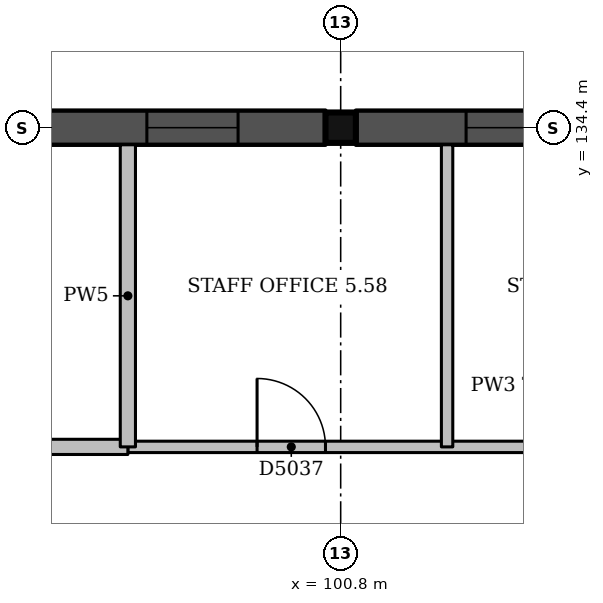
"""IFC4 building model, lengths in metres.
Left out: names, types, materials, properties, quantities, classifications, styles, units other than length and angle.
Written with IfcOpenShell. Run it as: python <this file> out.ifc"""

import sys

from ifc_helpers import new_model, si_unit, direction, frame, frame_2d, origin, origin_2d, place, context, subcontext, project, spatial, rectangle, extrude, element, fill, save


model = new_model("IFC4")
c1 = context("Model", 3, precision=1e-05, world=origin(), true_north=direction((0.0, 1.0)))
c2 = subcontext(c1, "Body", "Model", "MODEL_VIEW")
j1 = project(units=[si_unit("LENGTHUNIT", "METRE"), si_unit("PLANEANGLEUNIT", "RADIAN")], contexts=[c1])
p1 = place(None, origin())
s1 = spatial("IfcSite", under=j1, at=p1, CompositionType="ELEMENT")
p2 = place(p1, origin())
s2 = spatial("IfcBuilding", under=s1, at=p2, CompositionType="ELEMENT")
p3 = place(p2, frame((0.0, 0.0, 22.5)))
s3 = spatial("IfcBuildingStorey", under=s2, at=p3, CompositionType="ELEMENT", Elevation=22.5)
p4 = place(p3, frame((100.8, 134.4, 0.0), z_axis=(0.0, 0.0, 1.0), x_axis=(1.0, 0.0, 0.0)))
e1 = element("IfcColumn", 1, at=p4, inside=s3, PredefinedType="COLUMN", context=c2, shape_type="SweptSolid", body=[
    extrude(rectangle(XDim=0.4, YDim=0.4, at=origin_2d()), origin(), (0.0, 0.0, 1.0), 4.5),
])
p5 = place(p3, frame((104.7, 134.4, 0.0), z_axis=(0.0, 0.0, 1.0), x_axis=(-1.0, 0.0, 0.0)))
e2 = element("IfcWall", 2, at=p5, inside=s3, PredefinedType="SOLIDWALL", context=c2, shape_type="SweptSolid", body=[
    extrude(rectangle(XDim=3.7, YDim=0.45, at=frame_2d((1.85, 0.0))), origin(), (0.0, 0.0, 1.0), 3.6),
])
p6 = place(p5, frame((1.05, 0.0, 0.9)))
e3 = element("IfcOpeningElement", 3, at=p6, cuts=e2, PredefinedType="OPENING", context=c2, shape_type="SweptSolid", body=[
    extrude(rectangle(XDim=1.2, YDim=2.1, at=frame_2d((0.6, 1.05))), frame((0.0, 0.235, 0.0), z_axis=(0.0, -1.0, 0.0), x_axis=(1.0, 0.0, 0.0)), (0.0, 0.0, 1.0), 0.47),
])
p7 = place(p3, frame((100.6, 134.4, 0.0), z_axis=(0.0, 0.0, 1.0), x_axis=(-1.0, 0.0, 0.0)))
e4 = element("IfcWall", 4, at=p7, inside=s3, PredefinedType="SOLIDWALL", context=c2, shape_type="SweptSolid", body=[
    extrude(rectangle(XDim=3.7, YDim=0.45, at=frame_2d((1.85, 0.0))), origin(), (0.0, 0.0, 1.0), 3.6),
])
p8 = place(p7, frame((1.15, 0.0, 0.9)))
e5 = element("IfcOpeningElement", 5, at=p8, cuts=e4, PredefinedType="OPENING", context=c2, shape_type="SweptSolid", body=[
    extrude(rectangle(XDim=1.2, YDim=2.1, at=frame_2d((0.6, 1.05))), frame((0.0, 0.235, 0.0), z_axis=(0.0, -1.0, 0.0), x_axis=(1.0, 0.0, 0.0)), (0.0, 0.0, 1.0), 0.47),
])
p9 = place(p3, frame((98.0, 130.2, 0.0), z_axis=(0.0, 0.0, 1.0), x_axis=(1.0, 0.0, 0.0)))
e6 = element("IfcWall", 6, at=p9, inside=s3, PredefinedType="PARTITIONING", context=c2, shape_type="SweptSolid", body=[
    extrude(rectangle(XDim=11.05, YDim=0.15, at=frame_2d((5.525, 0.0))), origin(), (0.0, 0.0, 1.0), 3.6),
])
p10 = place(p9, frame((1.7, 0.0, 0.0)))
e7 = element("IfcOpeningElement", 7, at=p10, cuts=e6, PredefinedType="OPENING", context=c2, shape_type="SweptSolid", body=[
    extrude(rectangle(XDim=0.9, YDim=2.1, at=frame_2d((0.45, 1.05))), frame((0.0, 0.085, 0.0), z_axis=(0.0, -1.0, 0.0), x_axis=(1.0, 0.0, 0.0)), (0.0, 0.0, 1.0), 0.17),
])
p11 = place(p9, frame((5.9, 0.0, 0.0)))
e8 = element("IfcOpeningElement", 8, at=p11, cuts=e6, PredefinedType="OPENING", context=c2, shape_type="SweptSolid", body=[
    extrude(rectangle(XDim=0.9, YDim=2.1, at=frame_2d((0.45, 1.05))), frame((0.0, 0.085, 0.0), z_axis=(0.0, -1.0, 0.0), x_axis=(1.0, 0.0, 0.0)), (0.0, 0.0, 1.0), 0.17),
])
p12 = place(p9, frame((9.4, 0.0, 0.0)))
e9 = element("IfcOpeningElement", 9, at=p12, cuts=e6, PredefinedType="OPENING", context=c2, shape_type="SweptSolid", body=[
    extrude(rectangle(XDim=0.9, YDim=2.1, at=frame_2d((0.45, 1.05))), frame((0.0, 0.085, 0.0), z_axis=(0.0, -1.0, 0.0), x_axis=(1.0, 0.0, 0.0)), (0.0, 0.0, 1.0), 0.17),
])
p13 = place(p3, frame((89.6, 130.2, 0.0), z_axis=(0.0, 0.0, 1.0), x_axis=(1.0, 0.0, 0.0)))
e10 = element("IfcWall", 10, at=p13, inside=s3, PredefinedType="PARTITIONING", context=c2, shape_type="SweptSolid", body=[
    extrude(rectangle(XDim=8.4, YDim=0.2, at=frame_2d((4.2, 0.0))), origin(), (0.0, 0.0, 1.0), 3.6),
])
p14 = place(p13, frame((3.8, 0.0, 0.0)))
e11 = element("IfcOpeningElement", 11, at=p14, cuts=e10, PredefinedType="OPENING", context=c2, shape_type="SweptSolid", body=[
    extrude(rectangle(XDim=1.0, YDim=2.1, at=frame_2d((0.5, 1.05))), frame((0.0, 0.11, 0.0), z_axis=(0.0, -1.0, 0.0), x_axis=(1.0, 0.0, 0.0)), (0.0, 0.0, 1.0), 0.22),
])
p15 = place(p3, frame((98.0, 130.2, 0.0), z_axis=(0.0, 0.0, 1.0), x_axis=(0.0, 1.0, 0.0)))
e12 = element("IfcWall", 12, at=p15, inside=s3, PredefinedType="PARTITIONING", context=c2, shape_type="SweptSolid", body=[
    extrude(rectangle(XDim=3.975, YDim=0.2, at=frame_2d((1.988, 0.0))), origin(), (0.0, 0.0, 1.0), 4.15),
])
p16 = place(p3, frame((102.2, 130.2, 0.0), z_axis=(0.0, 0.0, 1.0), x_axis=(0.0, 1.0, 0.0)))
e13 = element("IfcWall", 13, at=p16, inside=s3, PredefinedType="PARTITIONING", context=c2, shape_type="SweptSolid", body=[
    extrude(rectangle(XDim=3.975, YDim=0.15, at=frame_2d((1.988, 0.0))), origin(), (0.0, 0.0, 1.0), 4.15),
])
p17 = place(p6, origin())
e14 = element("IfcWindow", 14, at=p17, inside=s3, PartitioningType="SINGLE_PANEL", PredefinedType="WINDOW", context=c2, shape_type="SweptSolid", body=[
    extrude(rectangle(XDim=1.2, YDim=2.1, at=frame_2d((0.6, 1.05))), frame((0.0, 0.135, 0.0), z_axis=(0.0, -1.0, 0.0), x_axis=(1.0, 0.0, 0.0)), (0.0, 0.0, 1.0), 0.06),
])
fill(e3, e14)
p18 = place(p8, origin())
e15 = element("IfcWindow", 15, at=p18, inside=s3, PartitioningType="SINGLE_PANEL", PredefinedType="WINDOW", context=c2, shape_type="SweptSolid", body=[
    extrude(rectangle(XDim=1.2, YDim=2.1, at=frame_2d((0.6, 1.05))), frame((0.0, 0.135, 0.0), z_axis=(0.0, -1.0, 0.0), x_axis=(1.0, 0.0, 0.0)), (0.0, 0.0, 1.0), 0.06),
])
fill(e5, e15)
p19 = place(p10, origin())
e16 = element("IfcDoor", 16, at=p19, inside=s3, OperationType="SINGLE_SWING_LEFT", PredefinedType="DOOR", context=c2, shape_type="SweptSolid", body=[
    extrude(rectangle(XDim=0.9, YDim=2.1, at=frame_2d((0.45, 1.05))), frame((0.0, 0.025, 0.0), z_axis=(0.0, -1.0, 0.0), x_axis=(1.0, 0.0, 0.0)), (0.0, 0.0, 1.0), 0.05),
])
fill(e7, e16)
save(model, sys.argv[1])
